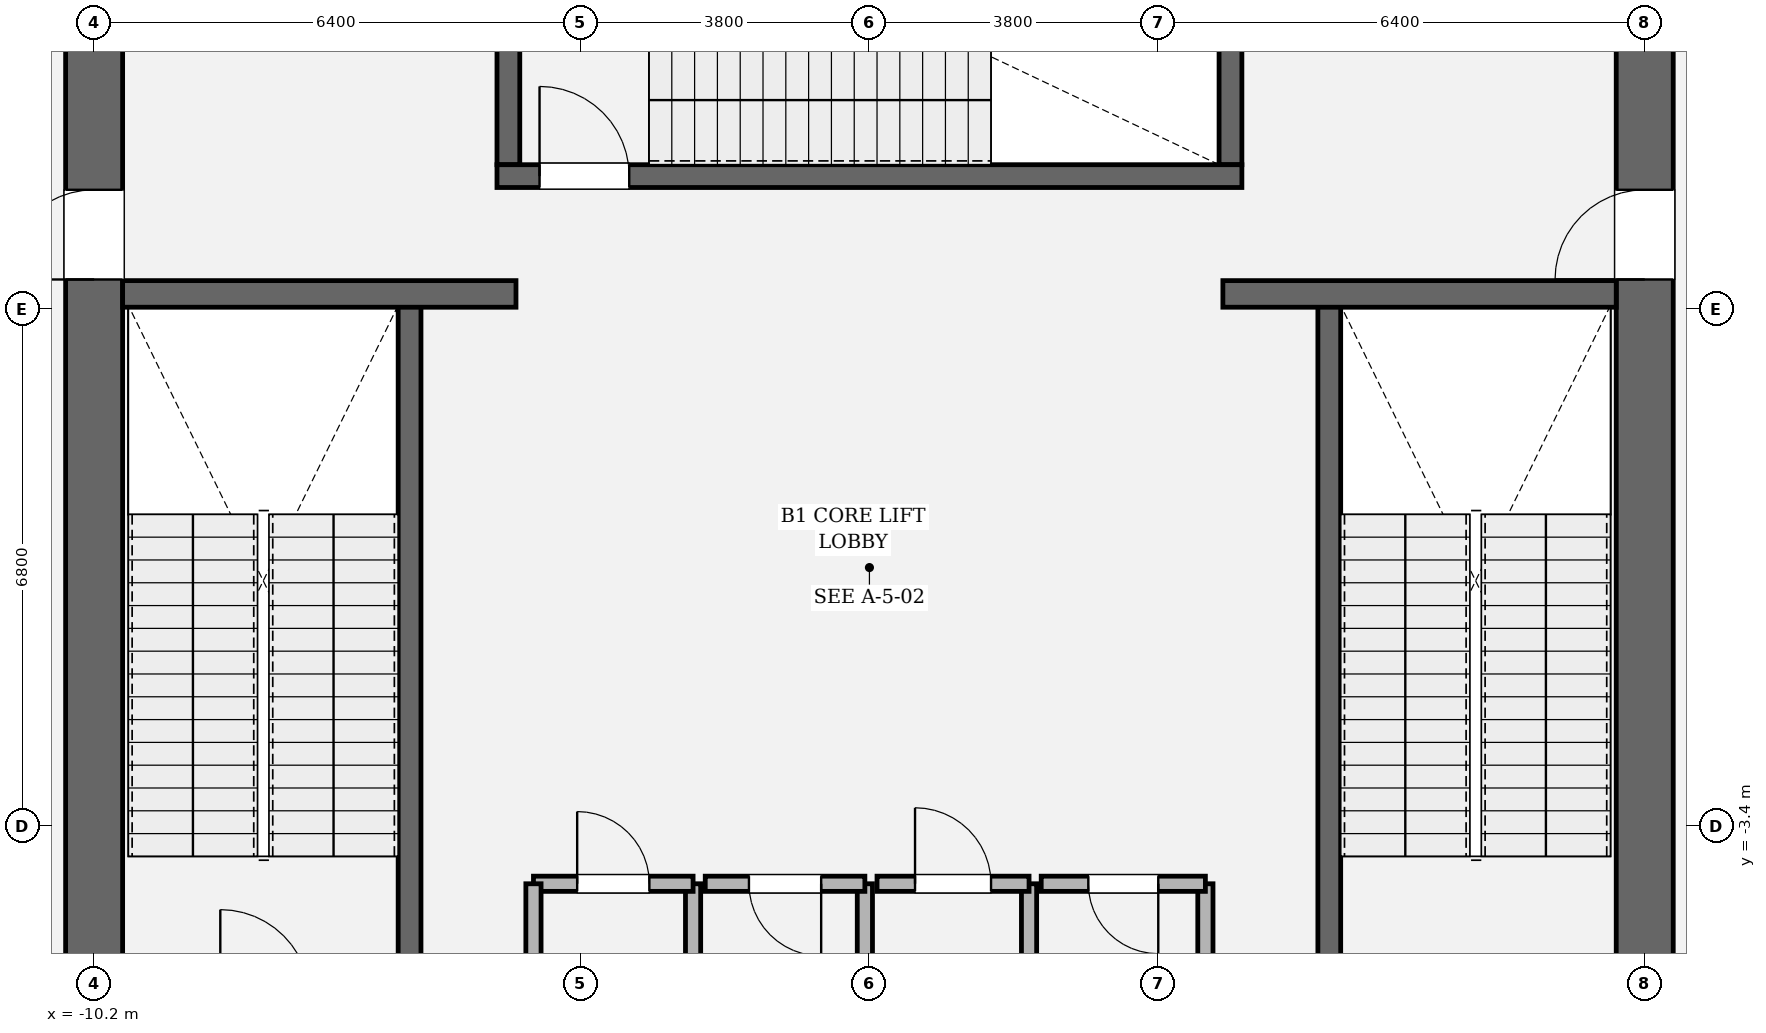
"""IFC4 building model, lengths in metres.
Left out: names, types, materials, properties, quantities, classifications, styles, units other than length and angle.
Written with IfcOpenShell. Run it as: python <this file> out.ifc"""

import sys

from ifc_helpers import new_model, si_unit, direction, frame, frame_2d, origin, place, context, subcontext, project, spatial, rectangle, extrude, element, fill, save


model = new_model("IFC4")
c1 = context("Model", 3, precision=1e-05, world=origin(), true_north=direction((0.0, 1.0)))
c2 = subcontext(c1, "Body", "Model", "MODEL_VIEW")
j1 = project(units=[si_unit("LENGTHUNIT", "METRE"), si_unit("PLANEANGLEUNIT", "RADIAN")], contexts=[c1])
p1 = place(None, origin())
s1 = spatial("IfcSite", under=j1, at=p1, CompositionType="ELEMENT")
p2 = place(p1, origin())
s2 = spatial("IfcBuilding", under=s1, at=p2, CompositionType="ELEMENT")
p3 = place(p2, frame((0.0, 0.0, -4.8)))
s3 = spatial("IfcBuildingStorey", under=s2, at=p3, CompositionType="ELEMENT", Elevation=-4.8)
p4 = place(p3, frame((-10.2, -8.825, 0.0), z_axis=(0.0, 0.0, 1.0), x_axis=(0.0, 1.0, 0.0)))
e1 = element("IfcWall", 1, at=p4, inside=s3, PredefinedType="SHEAR", context=c2, shape_type="SweptSolid", body=[
    extrude(rectangle(XDim=17.65, YDim=0.75, at=frame_2d((8.825, 0.0))), origin(), (0.0, 0.0, 1.0), 4.8),
])
p5 = place(p4, frame((12.615, 0.0, 0.0)))
e2 = element("IfcOpeningElement", 2, at=p5, cuts=e1, PredefinedType="OPENING", context=c2, shape_type="SweptSolid", body=[
    extrude(rectangle(XDim=1.18, YDim=2.2, at=frame_2d((0.59, 1.1))), frame((0.0, 0.385, 0.0), z_axis=(0.0, -1.0, 0.0), x_axis=(1.0, 0.0, 0.0)), (0.0, 0.0, 1.0), 0.77),
])
p6 = place(p3, frame((10.2, 8.825, 0.0), z_axis=(0.0, 0.0, 1.0), x_axis=(0.0, -1.0, 0.0)))
e3 = element("IfcWall", 3, at=p6, inside=s3, PredefinedType="SHEAR", context=c2, shape_type="SweptSolid", body=[
    extrude(rectangle(XDim=17.65, YDim=0.75, at=frame_2d((8.825, 0.0))), origin(), (0.0, 0.0, 1.0), 4.8),
])
p7 = place(p6, frame((3.855, 0.0, 0.0)))
e4 = element("IfcOpeningElement", 4, at=p7, cuts=e3, PredefinedType="OPENING", context=c2, shape_type="SweptSolid", body=[
    extrude(rectangle(XDim=1.18, YDim=2.2, at=frame_2d((0.59, 1.1))), frame((0.0, 0.385, 0.0), z_axis=(0.0, -1.0, 0.0), x_axis=(1.0, 0.0, 0.0)), (0.0, 0.0, 1.0), 0.77),
])
for number, where, z_axis, x_axis in (
    (5, (-6.05, -5.5, 0.0), (0.0, 0.0, 1.0), (0.0, 1.0, 0.0)),
    (6, (6.05, 3.45, 0.0), (0.0, 0.0, 1.0), (0.0, -1.0, 0.0)),
):
    element("IfcWall", number, at=place(p3, frame(where, z_axis=z_axis, x_axis=x_axis)), inside=s3, PredefinedType="SOLIDWALL", context=c2, shape_type="SweptSolid", body=[
        extrude(rectangle(XDim=8.95, YDim=0.3, at=frame_2d((4.475, 0.0))), origin(), (0.0, 0.0, 1.0), 4.8),
    ])
for number, where, z_axis, x_axis in (
    (7, (-4.75, 5.3, 0.0), (0.0, 0.0, 1.0), (0.0, 1.0, 0.0)),
    (8, (4.75, 8.825, 0.0), (0.0, 0.0, 1.0), (0.0, -1.0, 0.0)),
):
    element("IfcWall", number, at=place(p3, frame(where, z_axis=z_axis, x_axis=x_axis)), inside=s3, PredefinedType="SOLIDWALL", context=c2, shape_type="SweptSolid", body=[
        extrude(rectangle(XDim=3.525, YDim=0.3, at=frame_2d((1.762, 0.0))), origin(), (0.0, 0.0, 1.0), 4.8),
    ])
p8 = place(p3, frame((-4.9, 5.15, 0.0), z_axis=(0.0, 0.0, 1.0), x_axis=(1.0, 0.0, 0.0)))
e9 = element("IfcWall", 9, at=p8, inside=s3, PredefinedType="SOLIDWALL", context=c2, shape_type="SweptSolid", body=[
    extrude(rectangle(XDim=9.8, YDim=0.3, at=frame_2d((4.9, 0.0))), origin(), (0.0, 0.0, 1.0), 4.8),
])
p9 = place(p8, frame((0.56, 0.0, 0.0)))
e10 = element("IfcOpeningElement", 10, at=p9, cuts=e9, PredefinedType="OPENING", context=c2, shape_type="SweptSolid", body=[
    extrude(rectangle(XDim=1.18, YDim=2.2, at=frame_2d((0.59, 1.1))), frame((0.0, 0.16, 0.0), z_axis=(0.0, -1.0, 0.0), x_axis=(1.0, 0.0, 0.0)), (0.0, 0.0, 1.0), 0.32),
])
for number, where, z_axis, x_axis in (
    (11, (-9.825, 3.6, 0.0), (0.0, 0.0, 1.0), (1.0, 0.0, 0.0)),
    (12, (4.65, 3.6, 0.0), (0.0, 0.0, 1.0), (1.0, 0.0, 0.0)),
):
    element("IfcWall", number, at=place(p3, frame(where, z_axis=z_axis, x_axis=x_axis)), inside=s3, PredefinedType="SOLIDWALL", context=c2, shape_type="SweptSolid", body=[
        extrude(rectangle(XDim=5.175, YDim=0.35, at=frame_2d((2.587, 0.0))), origin(), (0.0, 0.0, 1.0), 4.8),
    ])
p10 = place(p3, frame((-2.32, -5.9, 0.0), z_axis=(0.0, 0.0, 1.0), x_axis=(0.0, 1.0, 0.0)))
e13 = element("IfcWall", 13, at=p10, inside=s3, PredefinedType="SOLIDWALL", context=c2, shape_type="SweptSolid", body=[
    extrude(rectangle(XDim=1.74, YDim=0.2, at=frame_2d((0.87, 0.0))), origin(), (0.0, 0.0, 1.0), 4.52),
])
p11 = place(p3, frame((-2.32, -4.16, 0.0), z_axis=(0.0, 0.0, 1.0), x_axis=(-1.0, 0.0, 0.0)))
e14 = element("IfcWall", 14, at=p11, inside=s3, PredefinedType="SOLIDWALL", context=c2, shape_type="SweptSolid", body=[
    extrude(rectangle(XDim=2.1, YDim=0.2, at=frame_2d((1.05, 0.0))), origin(), (0.0, 0.0, 1.0), 4.52),
])
p12 = place(p11, frame((0.575, 0.0, 0.0)))
e15 = element("IfcOpeningElement", 15, at=p12, cuts=e14, PredefinedType="OPENING", context=c2, shape_type="SweptSolid", body=[
    extrude(rectangle(XDim=0.95, YDim=2.15, at=frame_2d((0.475, 1.075))), frame((0.0, 0.11, 0.0), z_axis=(0.0, -1.0, 0.0), x_axis=(1.0, 0.0, 0.0)), (0.0, 0.0, 1.0), 0.22),
])
for number, where, z_axis, x_axis in (
    (16, (-4.42, -4.16, 0.0), (0.0, 0.0, 1.0), (0.0, -1.0, 0.0)),
    (17, (-0.06, -5.9, 0.0), (0.0, 0.0, 1.0), (0.0, 1.0, 0.0)),
):
    element("IfcWall", number, at=place(p3, frame(where, z_axis=z_axis, x_axis=x_axis)), inside=s3, PredefinedType="SOLIDWALL", context=c2, shape_type="SweptSolid", body=[
        extrude(rectangle(XDim=1.74, YDim=0.2, at=frame_2d((0.87, 0.0))), origin(), (0.0, 0.0, 1.0), 4.52),
    ])
p13 = place(p3, frame((-0.06, -4.16, 0.0), z_axis=(0.0, 0.0, 1.0), x_axis=(-1.0, 0.0, 0.0)))
e18 = element("IfcWall", 18, at=p13, inside=s3, PredefinedType="SOLIDWALL", context=c2, shape_type="SweptSolid", body=[
    extrude(rectangle(XDim=2.1, YDim=0.2, at=frame_2d((1.05, 0.0))), origin(), (0.0, 0.0, 1.0), 4.52),
])
p14 = place(p13, frame((0.575, 0.0, 0.0)))
e19 = element("IfcOpeningElement", 19, at=p14, cuts=e18, PredefinedType="OPENING", context=c2, shape_type="SweptSolid", body=[
    extrude(rectangle(XDim=0.95, YDim=2.15, at=frame_2d((0.475, 1.075))), frame((0.0, 0.11, 0.0), z_axis=(0.0, -1.0, 0.0), x_axis=(1.0, 0.0, 0.0)), (0.0, 0.0, 1.0), 0.22),
])
p15 = place(p3, frame((2.1, -5.9, 0.0), z_axis=(0.0, 0.0, 1.0), x_axis=(0.0, 1.0, 0.0)))
e20 = element("IfcWall", 20, at=p15, inside=s3, PredefinedType="SOLIDWALL", context=c2, shape_type="SweptSolid", body=[
    extrude(rectangle(XDim=1.74, YDim=0.2, at=frame_2d((0.87, 0.0))), origin(), (0.0, 0.0, 1.0), 4.52),
])
p16 = place(p3, frame((2.1, -4.16, 0.0), z_axis=(0.0, 0.0, 1.0), x_axis=(-1.0, 0.0, 0.0)))
e21 = element("IfcWall", 21, at=p16, inside=s3, PredefinedType="SOLIDWALL", context=c2, shape_type="SweptSolid", body=[
    extrude(rectangle(XDim=2.0, YDim=0.2, at=frame_2d((1.0, 0.0))), origin(), (0.0, 0.0, 1.0), 4.52),
])
p17 = place(p16, frame((0.5, 0.0, 0.0)))
e22 = element("IfcOpeningElement", 22, at=p17, cuts=e21, PredefinedType="OPENING", context=c2, shape_type="SweptSolid", body=[
    extrude(rectangle(XDim=1.0, YDim=2.15, at=frame_2d((0.5, 1.075))), frame((0.0, 0.11, 0.0), z_axis=(0.0, -1.0, 0.0), x_axis=(1.0, 0.0, 0.0)), (0.0, 0.0, 1.0), 0.22),
])
p18 = place(p3, frame((4.42, -5.9, 0.0), z_axis=(0.0, 0.0, 1.0), x_axis=(0.0, 1.0, 0.0)))
e23 = element("IfcWall", 23, at=p18, inside=s3, PredefinedType="SOLIDWALL", context=c2, shape_type="SweptSolid", body=[
    extrude(rectangle(XDim=1.74, YDim=0.2, at=frame_2d((0.87, 0.0))), origin(), (0.0, 0.0, 1.0), 4.52),
])
p19 = place(p3, frame((4.42, -4.16, 0.0), z_axis=(0.0, 0.0, 1.0), x_axis=(-1.0, 0.0, 0.0)))
e24 = element("IfcWall", 24, at=p19, inside=s3, PredefinedType="SOLIDWALL", context=c2, shape_type="SweptSolid", body=[
    extrude(rectangle(XDim=2.16, YDim=0.2, at=frame_2d((1.08, 0.0))), origin(), (0.0, 0.0, 1.0), 4.52),
])
p20 = place(p19, frame((0.62, 0.0, 0.0)))
e25 = element("IfcOpeningElement", 25, at=p20, cuts=e24, PredefinedType="OPENING", context=c2, shape_type="SweptSolid", body=[
    extrude(rectangle(XDim=0.92, YDim=2.1, at=frame_2d((0.46, 1.05))), frame((0.0, 0.11, 0.0), z_axis=(0.0, -1.0, 0.0), x_axis=(1.0, 0.0, 0.0)), (0.0, 0.0, 1.0), 0.22),
])
p21 = place(p9, origin())
e26 = element("IfcDoor", 26, at=p21, inside=s3, OperationType="SINGLE_SWING_LEFT", PredefinedType="DOOR", context=c2, shape_type="SweptSolid", body=[
    extrude(rectangle(XDim=1.18, YDim=2.2, at=frame_2d((0.59, 1.1))), frame((0.0, 0.025, 0.0), z_axis=(0.0, -1.0, 0.0), x_axis=(1.0, 0.0, 0.0)), (0.0, 0.0, 1.0), 0.05),
])
fill(e10, e26)
p22 = place(p5, origin())
e27 = element("IfcDoor", 27, at=p22, inside=s3, OperationType="SINGLE_SWING_LEFT", PredefinedType="DOOR", context=c2, shape_type="SweptSolid", body=[
    extrude(rectangle(XDim=1.18, YDim=2.2, at=frame_2d((0.59, 1.1))), frame((0.0, 0.025, 0.0), z_axis=(0.0, -1.0, 0.0), x_axis=(1.0, 0.0, 0.0)), (0.0, 0.0, 1.0), 0.05),
])
fill(e2, e27)
p23 = place(p7, origin())
e28 = element("IfcDoor", 28, at=p23, inside=s3, OperationType="SINGLE_SWING_RIGHT", PredefinedType="DOOR", context=c2, shape_type="SweptSolid", body=[
    extrude(rectangle(XDim=1.18, YDim=2.2, at=frame_2d((0.59, 1.1))), frame((0.0, 0.025, 0.0), z_axis=(0.0, -1.0, 0.0), x_axis=(1.0, 0.0, 0.0)), (0.0, 0.0, 1.0), 0.05),
])
fill(e4, e28)
p24 = place(p12, origin())
e29 = element("IfcDoor", 29, at=p24, inside=s3, OperationType="SINGLE_SWING_RIGHT", PredefinedType="DOOR", context=c2, shape_type="SweptSolid", body=[
    extrude(rectangle(XDim=0.95, YDim=2.15, at=frame_2d((0.475, 1.075))), frame((0.0, 0.025, 0.0), z_axis=(0.0, -1.0, 0.0), x_axis=(1.0, 0.0, 0.0)), (0.0, 0.0, 1.0), 0.05),
])
fill(e15, e29)
p25 = place(p14, origin())
e30 = element("IfcDoor", 30, at=p25, inside=s3, OperationType="SINGLE_SWING_LEFT", PredefinedType="DOOR", context=c2, shape_type="SweptSolid", body=[
    extrude(rectangle(XDim=0.95, YDim=2.15, at=frame_2d((0.475, 1.075))), frame((0.0, 0.025, 0.0), z_axis=(0.0, -1.0, 0.0), x_axis=(1.0, 0.0, 0.0)), (0.0, 0.0, 1.0), 0.05),
])
fill(e19, e30)
p26 = place(p17, origin())
e31 = element("IfcDoor", 31, at=p26, inside=s3, OperationType="SINGLE_SWING_RIGHT", PredefinedType="DOOR", context=c2, shape_type="SweptSolid", body=[
    extrude(rectangle(XDim=1.0, YDim=2.15, at=frame_2d((0.5, 1.075))), frame((0.0, 0.025, 0.0), z_axis=(0.0, -1.0, 0.0), x_axis=(1.0, 0.0, 0.0)), (0.0, 0.0, 1.0), 0.05),
])
fill(e22, e31)
p27 = place(p20, origin())
e32 = element("IfcDoor", 32, at=p27, inside=s3, OperationType="SINGLE_SWING_LEFT", PredefinedType="DOOR", context=c2, shape_type="SweptSolid", body=[
    extrude(rectangle(XDim=0.92, YDim=2.1, at=frame_2d((0.46, 1.05))), frame((0.0, 0.025, 0.0), z_axis=(0.0, -1.0, 0.0), x_axis=(1.0, 0.0, 0.0)), (0.0, 0.0, 1.0), 0.05),
])
fill(e25, e32)
save(model, sys.argv[1])
